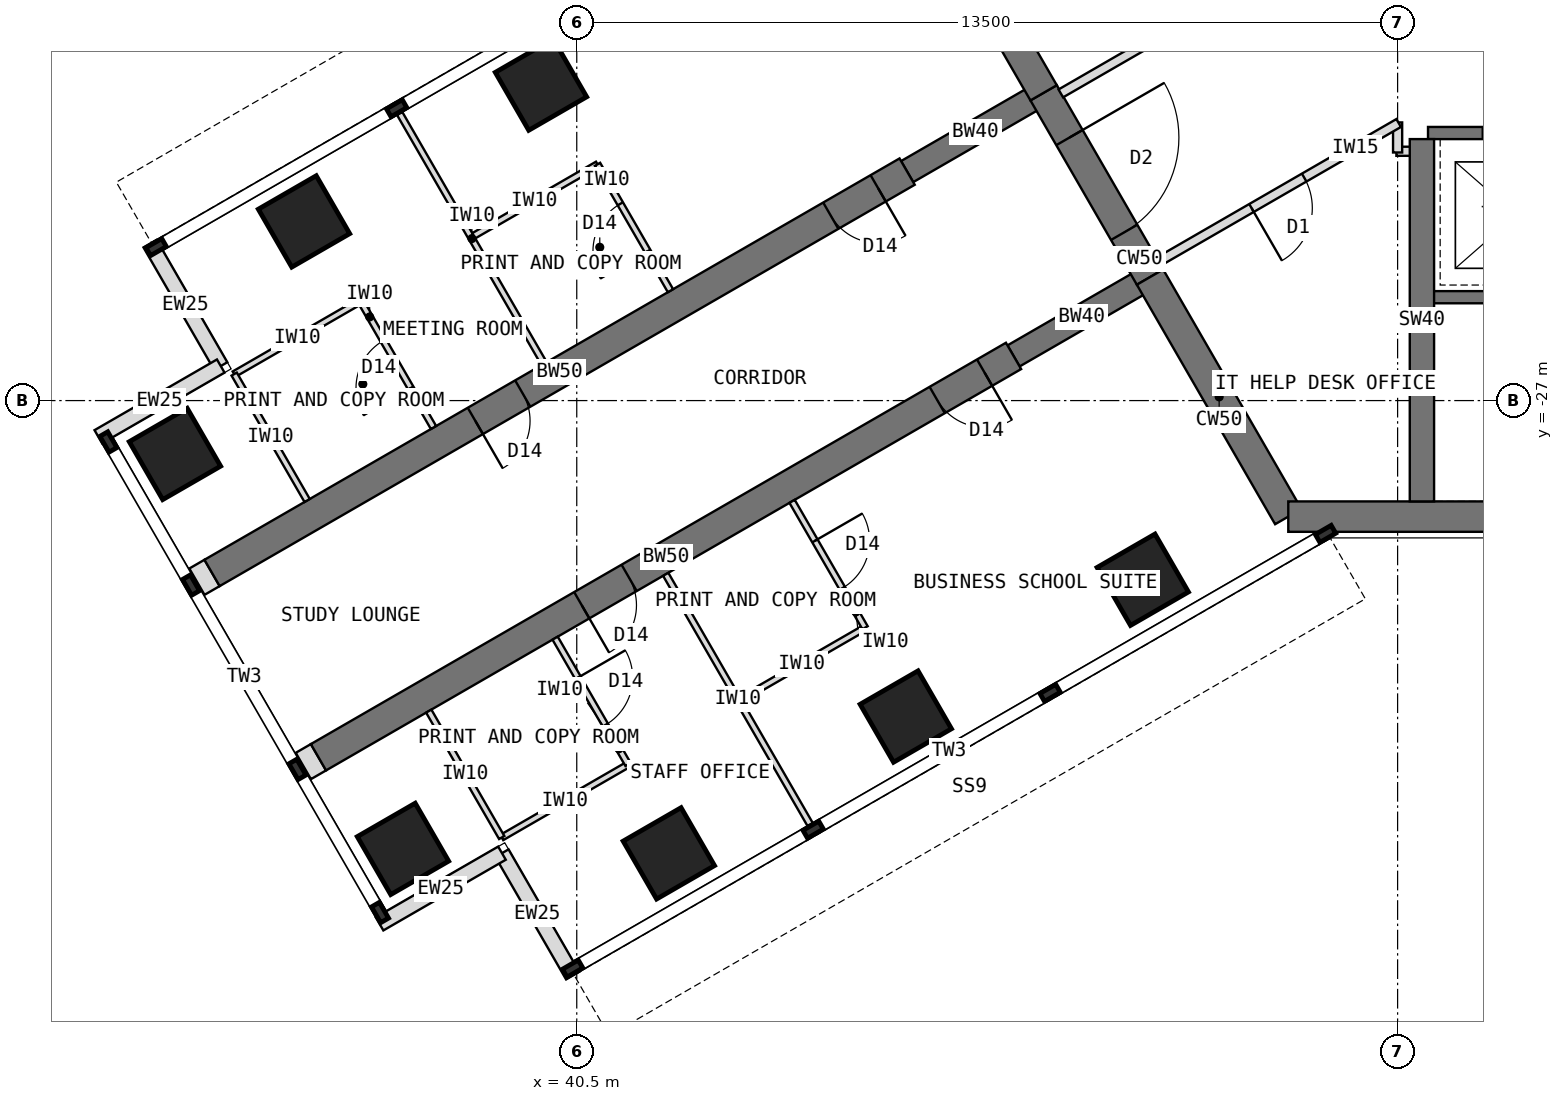
"""IFC4 building model, lengths in metres.
Left out: names, types, materials, properties, quantities, classifications, styles, units other than length and angle.
Written with IfcOpenShell. Run it as: python <this file> out.ifc"""

import sys

from ifc_helpers import new_model, si_unit, direction, frame, frame_2d, origin, origin_2d, place, context, subcontext, project, spatial, rectangle, extrude, element, fill, save


model = new_model("IFC4")
c1 = context("Model", 3, precision=1e-05, world=origin(), true_north=direction((0.0, 1.0)))
c2 = subcontext(c1, "Body", "Model", "MODEL_VIEW")
j1 = project(units=[si_unit("LENGTHUNIT", "METRE"), si_unit("PLANEANGLEUNIT", "RADIAN")], contexts=[c1])
p1 = place(None, origin())
s1 = spatial("IfcSite", under=j1, at=p1, CompositionType="ELEMENT")
p2 = place(p1, origin())
s2 = spatial("IfcBuilding", under=s1, at=p2, CompositionType="ELEMENT")
p3 = place(p2, frame((0.0, 0.0, 218.5)))
s3 = spatial("IfcBuildingStorey", under=s2, at=p3, CompositionType="ELEMENT", Elevation=218.5)
p4 = place(p3, frame((45.904, -18.0, 0.0), z_axis=(0.0, 0.0, 1.0), x_axis=(0.500024481964, -0.866011268655, 0.0)))
e1 = element("IfcWall", 1, at=p4, inside=s3, PredefinedType="SHEAR", context=c2, shape_type="SweptSolid", body=[
    extrude(rectangle(XDim=4.548, YDim=0.5, at=frame_2d((2.274, 0.0))), origin(), (0.0, 0.0, 1.0), 4.0),
])
p5 = place(p3, frame((48.178, -21.939, 0.0), z_axis=(0.0, 0.0, 1.0), x_axis=(0.500010275428, -0.866019471182, 0.0)))
e2 = element("IfcWall", 2, at=p5, inside=s3, PredefinedType="SHEAR", context=c2, shape_type="SweptSolid", body=[
    extrude(rectangle(XDim=3.5, YDim=0.5, at=frame_2d((1.75, 0.0))), origin(), (0.0, 0.0, 1.0), 4.0),
])
p6 = place(p5, frame((0.85, 0.0, 0.0)))
e3 = element("IfcOpeningElement", 3, at=p6, cuts=e2, PredefinedType="OPENING", context=c2, shape_type="SweptSolid", body=[
    extrude(rectangle(XDim=1.8, YDim=2.1, at=frame_2d((0.9, 1.05))), frame((0.0, 0.26, 0.0), z_axis=(0.0, -1.0, 0.0), x_axis=(1.0, 0.0, 0.0)), (0.0, 0.0, 1.0), 0.52),
])
p7 = place(p3, frame((49.928, -24.97, 0.0), z_axis=(0.0, 0.0, 1.0), x_axis=(0.499984222037, -0.866034513004, 0.0)))
e4 = element("IfcWall", 4, at=p7, inside=s3, PredefinedType="SHEAR", context=c2, shape_type="SweptSolid", body=[
    extrude(rectangle(XDim=4.548, YDim=0.5, at=frame_2d((2.274, 0.0))), origin(), (0.0, 0.0, 1.0), 4.0),
])
p8 = place(p3, frame((52.202, -28.908, 0.0), z_axis=(0.0, 0.0, 1.0), x_axis=(1.0, 0.0, 0.0)))
e5 = element("IfcWall", 5, at=p8, inside=s3, PredefinedType="SHEAR", context=c2, shape_type="SweptSolid", body=[
    extrude(rectangle(XDim=12.596, YDim=0.5, at=frame_2d((6.298, 0.0))), origin(), (0.0, 0.0, 1.0), 4.0),
])
p9 = place(p3, frame((49.928, -24.97, 0.0), z_axis=(0.0, 0.0, 1.0), x_axis=(-0.866031863473, -0.499988811324, 0.0)))
e6 = element("IfcWall", 6, at=p9, inside=s3, PredefinedType="SHEAR", context=c2, shape_type="SweptSolid", body=[
    extrude(rectangle(XDim=2.592, YDim=0.4, at=frame_2d((1.296, 0.0))), origin(), (0.0, 0.0, 1.0), 4.0),
])
p10 = place(p3, frame((47.684, -26.266, 0.0), z_axis=(0.0, 0.0, 1.0), x_axis=(-0.866027579429, -0.499996231654, 0.0)))
e7 = element("IfcWall", 7, at=p10, inside=s3, PredefinedType="SHEAR", context=c2, shape_type="SweptSolid", body=[
    extrude(rectangle(XDim=13.2, YDim=0.5, at=frame_2d((6.6, 0.0))), origin(), (0.0, 0.0, 1.0), 4.0),
])
p11 = place(p10, frame((0.55, 0.0, 0.0)))
e8 = element("IfcOpeningElement", 8, at=p11, cuts=e7, PredefinedType="OPENING", context=c2, shape_type="SweptSolid", body=[
    extrude(rectangle(XDim=0.9, YDim=2.1, at=frame_2d((0.45, 1.05))), frame((0.0, 0.26, 0.0), z_axis=(0.0, -1.0, 0.0), x_axis=(1.0, 0.0, 0.0)), (0.0, 0.0, 1.0), 0.52),
])
p12 = place(p10, frame((7.3, 0.0, 0.0)))
e9 = element("IfcOpeningElement", 9, at=p12, cuts=e7, PredefinedType="OPENING", context=c2, shape_type="SweptSolid", body=[
    extrude(rectangle(XDim=0.9, YDim=2.1, at=frame_2d((0.45, 1.05))), frame((0.0, 0.26, 0.0), z_axis=(0.0, -1.0, 0.0), x_axis=(1.0, 0.0, 0.0)), (0.0, 0.0, 1.0), 0.52),
])
p13 = place(p3, frame((48.178, -21.939, 0.0), z_axis=(0.0, 0.0, 1.0), x_axis=(-0.866072649678, -0.499918158782, 0.0)))
e10 = element("IfcWall", 10, at=p13, inside=s3, PredefinedType="SHEAR", context=c2, shape_type="SweptSolid", body=[
    extrude(rectangle(XDim=2.592, YDim=0.4, at=frame_2d((1.296, 0.0))), origin(), (0.0, 0.0, 1.0), 4.0),
])
p14 = place(p3, frame((45.934, -23.234, 0.0), z_axis=(0.0, 0.0, 1.0), x_axis=(-0.866019570528, -0.500010103361, 0.0)))
e11 = element("IfcWall", 11, at=p14, inside=s3, PredefinedType="SHEAR", context=c2, shape_type="SweptSolid", body=[
    extrude(rectangle(XDim=13.2, YDim=0.5, at=frame_2d((6.6, 0.0))), origin(), (0.0, 0.0, 1.0), 4.0),
])
p15 = place(p14, frame((0.55, 0.0, 0.0)))
e12 = element("IfcOpeningElement", 12, at=p15, cuts=e11, PredefinedType="OPENING", context=c2, shape_type="SweptSolid", body=[
    extrude(rectangle(XDim=0.9, YDim=2.1, at=frame_2d((0.45, 1.05))), frame((0.0, 0.26, 0.0), z_axis=(0.0, -1.0, 0.0), x_axis=(1.0, 0.0, 0.0)), (0.0, 0.0, 1.0), 0.52),
])
p16 = place(p14, frame((7.3, 0.0, 0.0)))
e13 = element("IfcOpeningElement", 13, at=p16, cuts=e11, PredefinedType="OPENING", context=c2, shape_type="SweptSolid", body=[
    extrude(rectangle(XDim=0.9, YDim=2.1, at=frame_2d((0.45, 1.05))), frame((0.0, 0.26, 0.0), z_axis=(0.0, -1.0, 0.0), x_axis=(1.0, 0.0, 0.0)), (0.0, 0.0, 1.0), 0.52),
])
for number, where, z_axis, x_axis in (
    (14, (49.809, -29.946, 0.0), (0.0, 0.0, 1.0), (0.866, 0.5, 0.0)),
    (15, (45.912, -32.196, 0.0), (0.0, 0.0, 1.0), (0.866, 0.5, 0.0)),
    (16, (39.912, -21.804, 0.0), (0.0, 0.0, 1.0), (0.866, 0.5, 0.0)),
    (17, (42.014, -34.446, 0.0), (0.0, 0.0, 1.0), (0.866, 0.5, 0.0)),
    (18, (36.014, -24.054, 0.0), (0.0, 0.0, 1.0), (0.866, 0.5, 0.0)),
    (19, (37.642, -34.373, 0.0), (0.0, 0.0, 1.0), (0.866, 0.5, 0.0)),
    (20, (33.892, -27.877, 0.0), (0.0, 0.0, 1.0), (0.866, 0.5, 0.0)),
):
    element("IfcColumn", number, at=place(p3, frame(where, z_axis=z_axis, x_axis=x_axis)), inside=s3, PredefinedType="COLUMN", context=c2, shape_type="SweptSolid", body=[
        extrude(rectangle(XDim=1.1, YDim=1.1, at=origin_2d()), origin(), (0.0, 0.0, 1.0), 4.0),
    ])
for number, where, z_axis, x_axis in (
    (21, (40.433, -36.456, 0.0), (0.0, 0.0, 1.0), (-0.5, 0.866, 0.0)),
    (22, (39.27, -34.443, 0.0), (0.0, 0.0, 1.0), (-0.866, -0.5, 0.0)),
    (23, (33.483, -24.419, 0.0), (0.0, 0.0, 1.0), (0.5, -0.866, 0.0)),
    (24, (34.645, -26.432, 0.0), (0.0, 0.0, 1.0), (-0.866, -0.5, 0.0)),
):
    element("IfcWall", number, at=place(p3, frame(where, z_axis=z_axis, x_axis=x_axis)), inside=s3, PredefinedType="STANDARD", context=c2, shape_type="SweptSolid", body=[
        extrude(rectangle(XDim=2.325, YDim=0.25, at=frame_2d((1.163, 0.0))), origin(), (0.0, 0.0, 1.0), 3.8),
    ])
for number, where, z_axis, x_axis in (
    (25, (36.252, -32.865, 0.0), (0.0, 0.0, 1.0), (-0.866, -0.5, 0.0)),
    (26, (34.502, -29.834, 0.0), (0.0, 0.0, 1.0), (-0.866, -0.5, 0.0)),
):
    element("IfcWall", number, at=place(p3, frame(where, z_axis=z_axis, x_axis=x_axis)), inside=s3, PredefinedType="PARTITIONING", context=c2, shape_type="SweptSolid", body=[
        extrude(rectangle(XDim=0.288, YDim=0.5, at=frame_2d((0.144, 0.0))), origin(), (0.0, 0.0, 1.0), 3.8),
    ])
p17 = place(p3, frame((54.5, -22.6, 0.0), z_axis=(0.0, 0.0, 1.0), x_axis=(1.0, 0.0, 0.0)))
e27 = element("IfcWall", 27, at=p17, inside=s3, PredefinedType="SHEAR", context=c2, shape_type="SweptSolid", body=[
    extrude(rectangle(XDim=8.0, YDim=0.2, at=frame_2d((4.0, 0.0))), origin(), (0.0, 0.0, 1.0), 4.0),
])
p18 = place(p17, frame((6.3, 0.0, 0.0)))
e28 = element("IfcOpeningElement", 28, at=p18, cuts=e27, PredefinedType="OPENING", context=c2, shape_type="SweptSolid", body=[
    extrude(rectangle(XDim=1.2, YDim=2.1, at=frame_2d((0.6, 1.05))), frame((0.0, 0.11, 0.0), z_axis=(0.0, -1.0, 0.0), x_axis=(1.0, 0.0, 0.0)), (0.0, 0.0, 1.0), 0.22),
])
p19 = place(p17, frame((0.9, 0.0, 0.0)))
e29 = element("IfcOpeningElement", 29, at=p19, cuts=e27, PredefinedType="OPENING", context=c2, shape_type="SweptSolid", body=[
    extrude(rectangle(XDim=1.1, YDim=2.2, at=frame_2d((0.55, 1.1))), frame((0.0, 0.11, 0.0), z_axis=(0.0, -1.0, 0.0), x_axis=(1.0, 0.0, 0.0)), (0.0, 0.0, 1.0), 0.22),
])
p20 = place(p3, frame((54.5, -25.3, 0.0), z_axis=(0.0, 0.0, 1.0), x_axis=(1.0, 0.0, 0.0)))
e30 = element("IfcWall", 30, at=p20, inside=s3, PredefinedType="SHEAR", context=c2, shape_type="SweptSolid", body=[
    extrude(rectangle(XDim=8.0, YDim=0.2, at=frame_2d((4.0, 0.0))), origin(), (0.0, 0.0, 1.0), 4.0),
])
p21 = place(p20, frame((6.7, 0.0, 0.0)))
e31 = element("IfcOpeningElement", 31, at=p21, cuts=e30, PredefinedType="OPENING", context=c2, shape_type="SweptSolid", body=[
    extrude(rectangle(XDim=1.1, YDim=2.1, at=frame_2d((0.55, 1.05))), frame((0.0, 0.11, 0.0), z_axis=(0.0, -1.0, 0.0), x_axis=(1.0, 0.0, 0.0)), (0.0, 0.0, 1.0), 0.22),
])
p22 = place(p3, frame((54.4, -22.7, 0.0), z_axis=(0.0, 0.0, 1.0), x_axis=(0.0, -1.0, 0.0)))
e32 = element("IfcWall", 32, at=p22, inside=s3, PredefinedType="SHEAR", context=c2, shape_type="SweptSolid", body=[
    extrude(rectangle(XDim=5.958, YDim=0.4, at=frame_2d((2.979, 0.0))), origin(), (0.0, 0.0, 1.0), 4.0),
])
p23 = place(p3, frame((41.963, -29.857, 0.0), z_axis=(0.0, 0.0, 1.0), x_axis=(0.499986429846, -0.866033238375, 0.0)))
e33 = element("IfcWall", 33, at=p23, inside=s3, PredefinedType="PARTITIONING", context=c2, shape_type="SweptSolid", body=[
    extrude(rectangle(XDim=4.75, YDim=0.1, at=frame_2d((2.375, 0.0))), origin(), (0.0, 0.0, 1.0), 3.8),
])
p24 = place(p3, frame((45.241, -30.736, 0.0), z_axis=(0.0, 0.0, 1.0), x_axis=(-0.866024647952, -0.500001309137, 0.0)))
e34 = element("IfcWall", 34, at=p24, inside=s3, PredefinedType="PARTITIONING", context=c2, shape_type="SweptSolid", body=[
    extrude(rectangle(XDim=2.4, YDim=0.1, at=frame_2d((1.2, 0.0))), origin(), (0.0, 0.0, 1.0), 3.8),
])
p25 = place(p3, frame((44.042, -28.657, 0.0), z_axis=(0.0, 0.0, 1.0), x_axis=(0.499957262057, -0.866050077142, 0.0)))
e35 = element("IfcWall", 35, at=p25, inside=s3, PredefinedType="PARTITIONING", context=c2, shape_type="SweptSolid", body=[
    extrude(rectangle(XDim=2.4, YDim=0.1, at=frame_2d((1.2, 0.0))), origin(), (0.0, 0.0, 1.0), 3.8),
])
p26 = place(p25, frame((0.75, 0.0, 0.0)))
e36 = element("IfcOpeningElement", 36, at=p26, cuts=e35, PredefinedType="OPENING", context=c2, shape_type="SweptSolid", body=[
    extrude(rectangle(XDim=0.9, YDim=2.1, at=frame_2d((0.45, 1.05))), frame((0.0, 0.06, 0.0), z_axis=(0.0, -1.0, 0.0), x_axis=(1.0, 0.0, 0.0)), (0.0, 0.0, 1.0), 0.12),
])
p27 = place(p3, frame((41.344, -32.986, 0.0), z_axis=(0.0, 0.0, 1.0), x_axis=(-0.866024647952, -0.500001309137, 0.0)))
e37 = element("IfcWall", 37, at=p27, inside=s3, PredefinedType="PARTITIONING", context=c2, shape_type="SweptSolid", body=[
    extrude(rectangle(XDim=2.4, YDim=0.1, at=frame_2d((1.2, 0.0))), origin(), (0.0, 0.0, 1.0), 3.8),
])
p28 = place(p3, frame((40.144, -30.907, 0.0), z_axis=(0.0, 0.0, 1.0), x_axis=(0.499957262057, -0.866050077142, 0.0)))
e38 = element("IfcWall", 38, at=p28, inside=s3, PredefinedType="PARTITIONING", context=c2, shape_type="SweptSolid", body=[
    extrude(rectangle(XDim=2.4, YDim=0.1, at=frame_2d((1.2, 0.0))), origin(), (0.0, 0.0, 1.0), 3.8),
])
p29 = place(p28, frame((0.75, 0.0, 0.0)))
e39 = element("IfcOpeningElement", 39, at=p29, cuts=e38, PredefinedType="OPENING", context=c2, shape_type="SweptSolid", body=[
    extrude(rectangle(XDim=0.9, YDim=2.1, at=frame_2d((0.45, 1.05))), frame((0.0, 0.06, 0.0), z_axis=(0.0, -1.0, 0.0), x_axis=(1.0, 0.0, 0.0)), (0.0, 0.0, 1.0), 0.12),
])
p30 = place(p3, frame((38.066, -32.107, 0.0), z_axis=(0.0, 0.0, 1.0), x_axis=(0.499957262057, -0.866050077142, 0.0)))
e40 = element("IfcWall", 40, at=p30, inside=s3, PredefinedType="PARTITIONING", context=c2, shape_type="SweptSolid", body=[
    extrude(rectangle(XDim=2.4, YDim=0.1, at=frame_2d((1.2, 0.0))), origin(), (0.0, 0.0, 1.0), 3.8),
])
p31 = place(p3, frame((39.963, -26.393, 0.0), z_axis=(0.0, 0.0, 1.0), x_axis=(-0.499986429846, 0.866033238375, 0.0)))
e41 = element("IfcWall", 41, at=p31, inside=s3, PredefinedType="PARTITIONING", context=c2, shape_type="SweptSolid", body=[
    extrude(rectangle(XDim=4.75, YDim=0.1, at=frame_2d((2.375, 0.0))), origin(), (0.0, 0.0, 1.0), 3.8),
])
p32 = place(p3, frame((40.842, -23.115, 0.0), z_axis=(0.0, 0.0, 1.0), x_axis=(-0.866050077142, -0.499957262057, 0.0)))
e42 = element("IfcWall", 42, at=p32, inside=s3, PredefinedType="PARTITIONING", context=c2, shape_type="SweptSolid", body=[
    extrude(rectangle(XDim=2.4, YDim=0.1, at=frame_2d((1.2, 0.0))), origin(), (0.0, 0.0, 1.0), 3.8),
])
p33 = place(p3, frame((42.042, -25.193, 0.0), z_axis=(0.0, 0.0, 1.0), x_axis=(-0.500001309137, 0.866024647952, 0.0)))
e43 = element("IfcWall", 43, at=p33, inside=s3, PredefinedType="PARTITIONING", context=c2, shape_type="SweptSolid", body=[
    extrude(rectangle(XDim=2.4, YDim=0.1, at=frame_2d((1.2, 0.0))), origin(), (0.0, 0.0, 1.0), 3.8),
])
p34 = place(p33, frame((0.75, 0.0, 0.0)))
e44 = element("IfcOpeningElement", 44, at=p34, cuts=e43, PredefinedType="OPENING", context=c2, shape_type="SweptSolid", body=[
    extrude(rectangle(XDim=0.9, YDim=2.1, at=frame_2d((0.45, 1.05))), frame((0.0, 0.06, 0.0), z_axis=(0.0, -1.0, 0.0), x_axis=(1.0, 0.0, 0.0)), (0.0, 0.0, 1.0), 0.12),
])
p35 = place(p3, frame((36.944, -25.365, 0.0), z_axis=(0.0, 0.0, 1.0), x_axis=(-0.866024647952, -0.500001309137, 0.0)))
e45 = element("IfcWall", 45, at=p35, inside=s3, PredefinedType="PARTITIONING", context=c2, shape_type="SweptSolid", body=[
    extrude(rectangle(XDim=2.4, YDim=0.1, at=frame_2d((1.2, 0.0))), origin(), (0.0, 0.0, 1.0), 3.8),
])
p36 = place(p3, frame((38.144, -27.443, 0.0), z_axis=(0.0, 0.0, 1.0), x_axis=(-0.500001309137, 0.866024647952, 0.0)))
e46 = element("IfcWall", 46, at=p36, inside=s3, PredefinedType="PARTITIONING", context=c2, shape_type="SweptSolid", body=[
    extrude(rectangle(XDim=2.4, YDim=0.1, at=frame_2d((1.2, 0.0))), origin(), (0.0, 0.0, 1.0), 3.8),
])
p37 = place(p36, frame((0.75, 0.0, 0.0)))
e47 = element("IfcOpeningElement", 47, at=p37, cuts=e46, PredefinedType="OPENING", context=c2, shape_type="SweptSolid", body=[
    extrude(rectangle(XDim=0.9, YDim=2.1, at=frame_2d((0.45, 1.05))), frame((0.0, 0.06, 0.0), z_axis=(0.0, -1.0, 0.0), x_axis=(1.0, 0.0, 0.0)), (0.0, 0.0, 1.0), 0.12),
])
p38 = place(p3, frame((36.066, -28.643, 0.0), z_axis=(0.0, 0.0, 1.0), x_axis=(-0.499957262057, 0.866050077142, 0.0)))
e48 = element("IfcWall", 48, at=p38, inside=s3, PredefinedType="PARTITIONING", context=c2, shape_type="SweptSolid", body=[
    extrude(rectangle(XDim=2.4, YDim=0.1, at=frame_2d((1.2, 0.0))), origin(), (0.0, 0.0, 1.0), 3.8),
])
p39 = place(p3, frame((54.41, -22.9, 0.0), z_axis=(0.0, 0.0, 1.0), x_axis=(-1.0, 0.0, 0.0)))
e49 = element("IfcWall", 49, at=p39, inside=s3, PredefinedType="PARTITIONING", context=c2, shape_type="SweptSolid", body=[
    extrude(rectangle(XDim=0.43, YDim=0.15, at=frame_2d((0.215, 0.0))), origin(), (0.0, 0.0, 1.0), 3.8),
])
p40 = place(p3, frame((54.0, -22.92, 0.0), z_axis=(0.0, 0.0, 1.0), x_axis=(0.0, 1.0, 0.0)))
e50 = element("IfcWall", 50, at=p40, inside=s3, PredefinedType="PARTITIONING", context=c2, shape_type="SweptSolid", body=[
    extrude(rectangle(XDim=0.494, YDim=0.15, at=frame_2d((0.247, 0.0))), origin(), (0.0, 0.0, 1.0), 3.8),
])
p41 = place(p3, frame((54.017, -22.436, 0.0), z_axis=(0.0, 0.0, 1.0), x_axis=(-0.866024503882, -0.500001558674, 0.0)))
e51 = element("IfcWall", 51, at=p41, inside=s3, PredefinedType="PARTITIONING", context=c2, shape_type="SweptSolid", body=[
    extrude(rectangle(XDim=4.568, YDim=0.15, at=frame_2d((2.284, 0.0))), origin(), (0.0, 0.0, 1.0), 3.8),
])
p42 = place(p41, frame((1.794, 0.0, 0.0)))
e52 = element("IfcOpeningElement", 52, at=p42, cuts=e51, PredefinedType="OPENING", context=c2, shape_type="SweptSolid", body=[
    extrude(rectangle(XDim=1.0, YDim=2.1, at=frame_2d((0.5, 1.05))), frame((0.0, 0.085, 0.0), z_axis=(0.0, -1.0, 0.0), x_axis=(1.0, 0.0, 0.0)), (0.0, 0.0, 1.0), 0.17),
])
p43 = place(p3, frame((48.461, -21.948, 0.0), z_axis=(0.0, 0.0, 1.0), x_axis=(0.866024503882, 0.500001558674, 0.0)))
e53 = element("IfcWall", 53, at=p43, inside=s3, PredefinedType="PARTITIONING", context=c2, shape_type="SweptSolid", body=[
    extrude(rectangle(XDim=4.568, YDim=0.15, at=frame_2d((2.284, 0.0))), origin(), (0.0, 0.0, 1.0), 3.8),
])
p44 = place(p43, frame((1.774, 0.0, 0.0)))
e54 = element("IfcOpeningElement", 54, at=p44, cuts=e53, PredefinedType="OPENING", context=c2, shape_type="SweptSolid", body=[
    extrude(rectangle(XDim=1.0, YDim=2.1, at=frame_2d((0.5, 1.05))), frame((0.0, 0.085, 0.0), z_axis=(0.0, -1.0, 0.0), x_axis=(1.0, 0.0, 0.0)), (0.0, 0.0, 1.0), 0.17),
])
p45 = place(p6, origin())
e55 = element("IfcDoor", 55, at=p45, inside=s3, OperationType="DOUBLE_DOOR_DOUBLE_SWING", PredefinedType="DOOR", context=c2, shape_type="SweptSolid", body=[
    extrude(rectangle(XDim=1.8, YDim=2.1, at=frame_2d((0.9, 1.05))), frame((0.0, 0.025, 0.0), z_axis=(0.0, -1.0, 0.0), x_axis=(1.0, 0.0, 0.0)), (0.0, 0.0, 1.0), 0.05),
])
fill(e3, e55)
p46 = place(p26, origin())
e56 = element("IfcDoor", 56, at=p46, inside=s3, OperationType="SINGLE_SWING_LEFT", PredefinedType="DOOR", context=c2, shape_type="SweptSolid", body=[
    extrude(rectangle(XDim=0.9, YDim=2.1, at=frame_2d((0.45, 1.05))), frame((0.0, 0.025, 0.0), z_axis=(0.0, -1.0, 0.0), x_axis=(1.0, 0.0, 0.0)), (0.0, 0.0, 1.0), 0.05),
])
fill(e36, e56)
p47 = place(p29, origin())
e57 = element("IfcDoor", 57, at=p47, inside=s3, OperationType="SINGLE_SWING_LEFT", PredefinedType="DOOR", context=c2, shape_type="SweptSolid", body=[
    extrude(rectangle(XDim=0.9, YDim=2.1, at=frame_2d((0.45, 1.05))), frame((0.0, 0.025, 0.0), z_axis=(0.0, -1.0, 0.0), x_axis=(1.0, 0.0, 0.0)), (0.0, 0.0, 1.0), 0.05),
])
fill(e39, e57)
p48 = place(p34, origin())
e58 = element("IfcDoor", 58, at=p48, inside=s3, OperationType="SINGLE_SWING_LEFT", PredefinedType="DOOR", context=c2, shape_type="SweptSolid", body=[
    extrude(rectangle(XDim=0.9, YDim=2.1, at=frame_2d((0.45, 1.05))), frame((0.0, 0.025, 0.0), z_axis=(0.0, -1.0, 0.0), x_axis=(1.0, 0.0, 0.0)), (0.0, 0.0, 1.0), 0.05),
])
fill(e44, e58)
p49 = place(p37, origin())
e59 = element("IfcDoor", 59, at=p49, inside=s3, OperationType="SINGLE_SWING_LEFT", PredefinedType="DOOR", context=c2, shape_type="SweptSolid", body=[
    extrude(rectangle(XDim=0.9, YDim=2.1, at=frame_2d((0.45, 1.05))), frame((0.0, 0.025, 0.0), z_axis=(0.0, -1.0, 0.0), x_axis=(1.0, 0.0, 0.0)), (0.0, 0.0, 1.0), 0.05),
])
fill(e47, e59)
p50 = place(p42, origin())
e60 = element("IfcDoor", 60, at=p50, inside=s3, OperationType="SINGLE_SWING_RIGHT", PredefinedType="DOOR", context=c2, shape_type="SweptSolid", body=[
    extrude(rectangle(XDim=1.0, YDim=2.1, at=frame_2d((0.5, 1.05))), frame((0.0, 0.025, 0.0), z_axis=(0.0, -1.0, 0.0), x_axis=(1.0, 0.0, 0.0)), (0.0, 0.0, 1.0), 0.05),
])
fill(e52, e60)
p51 = place(p11, origin())
e61 = element("IfcDoor", 61, at=p51, inside=s3, OperationType="SINGLE_SWING_LEFT", PredefinedType="DOOR", context=c2, shape_type="SweptSolid", body=[
    extrude(rectangle(XDim=0.9, YDim=2.1, at=frame_2d((0.45, 1.05))), frame((0.0, 0.025, 0.0), z_axis=(0.0, -1.0, 0.0), x_axis=(1.0, 0.0, 0.0)), (0.0, 0.0, 1.0), 0.05),
])
fill(e8, e61)
p52 = place(p12, origin())
e62 = element("IfcDoor", 62, at=p52, inside=s3, OperationType="SINGLE_SWING_RIGHT", PredefinedType="DOOR", context=c2, shape_type="SweptSolid", body=[
    extrude(rectangle(XDim=0.9, YDim=2.1, at=frame_2d((0.45, 1.05))), frame((0.0, 0.025, 0.0), z_axis=(0.0, -1.0, 0.0), x_axis=(1.0, 0.0, 0.0)), (0.0, 0.0, 1.0), 0.05),
])
fill(e9, e62)
p53 = place(p15, origin())
e63 = element("IfcDoor", 63, at=p53, inside=s3, OperationType="SINGLE_SWING_LEFT", PredefinedType="DOOR", context=c2, shape_type="SweptSolid", body=[
    extrude(rectangle(XDim=0.9, YDim=2.1, at=frame_2d((0.45, 1.05))), frame((0.0, 0.025, 0.0), z_axis=(0.0, -1.0, 0.0), x_axis=(1.0, 0.0, 0.0)), (0.0, 0.0, 1.0), 0.05),
])
fill(e12, e63)
p54 = place(p16, origin())
e64 = element("IfcDoor", 64, at=p54, inside=s3, OperationType="SINGLE_SWING_RIGHT", PredefinedType="DOOR", context=c2, shape_type="SweptSolid", body=[
    extrude(rectangle(XDim=0.9, YDim=2.1, at=frame_2d((0.45, 1.05))), frame((0.0, 0.025, 0.0), z_axis=(0.0, -1.0, 0.0), x_axis=(1.0, 0.0, 0.0)), (0.0, 0.0, 1.0), 0.05),
])
fill(e13, e64)
save(model, sys.argv[1])
